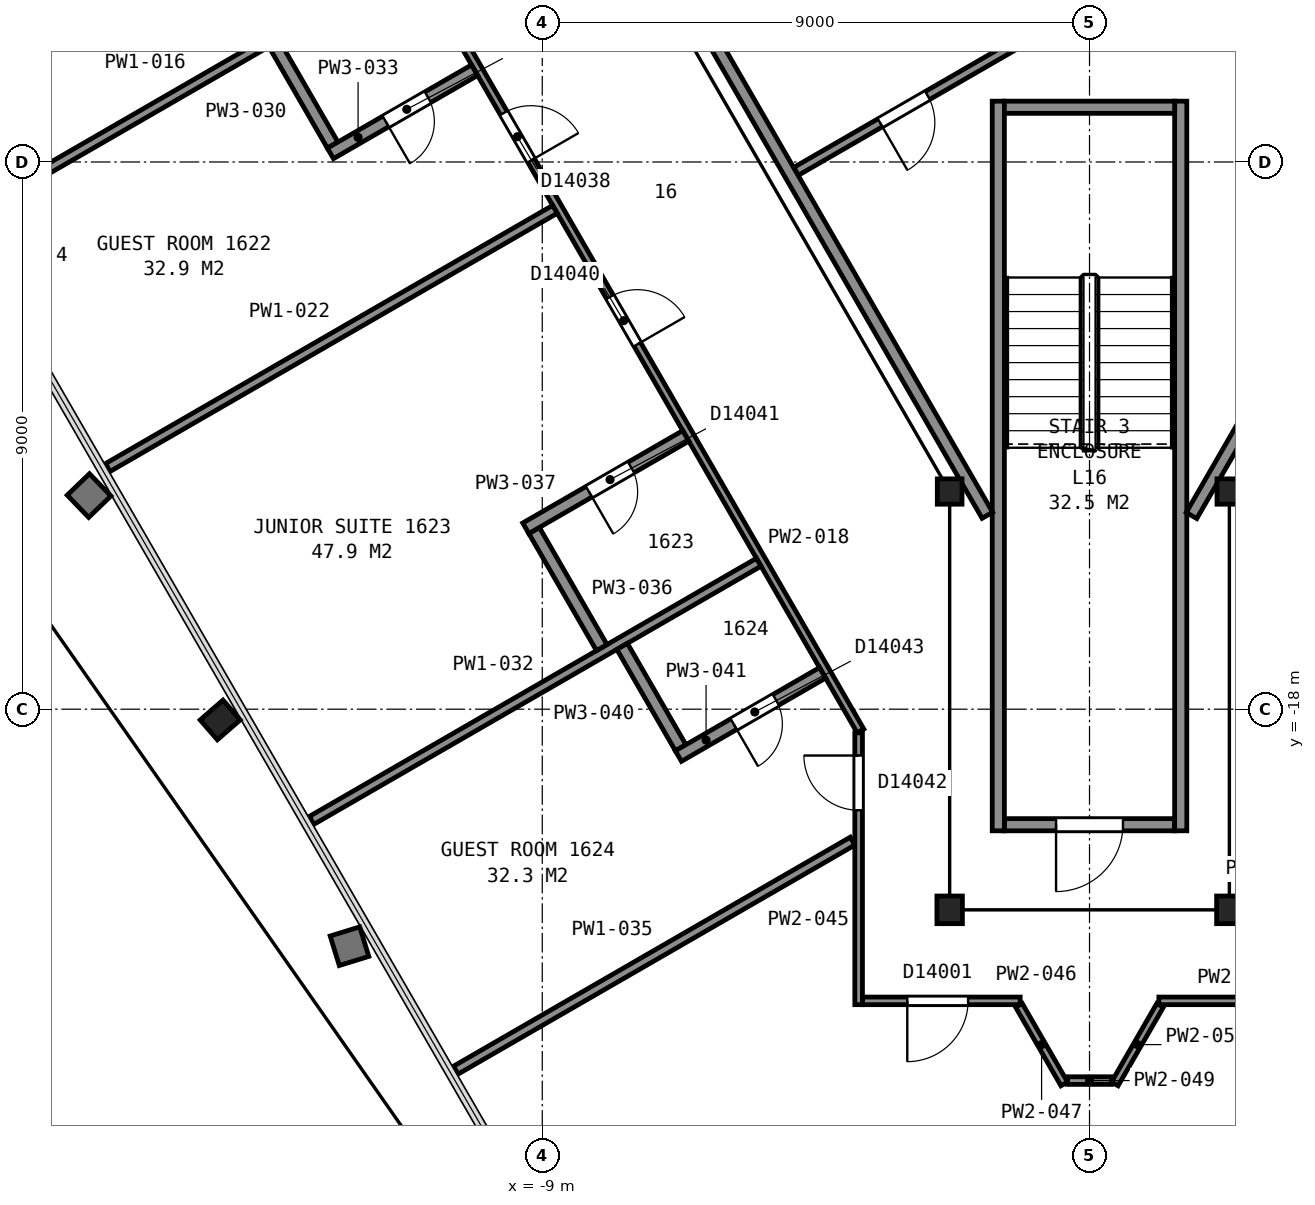
"""IFC4 building model, lengths in metres.
Left out: names, types, materials, properties, quantities, classifications, styles, units other than length and angle.
Written with IfcOpenShell. Run it as: python <this file> out.ifc"""

import sys

from ifc_helpers import new_model, si_unit, direction, frame, frame_2d, origin, origin_2d, place, context, subcontext, project, spatial, rectangle, i_section, extrude, element, fill, save


model = new_model("IFC4")
c1 = context("Model", 3, precision=1e-05, world=origin(), true_north=direction((0.0, 1.0)))
c2 = subcontext(c1, "Body", "Model", "MODEL_VIEW")
j1 = project(units=[si_unit("LENGTHUNIT", "METRE"), si_unit("PLANEANGLEUNIT", "RADIAN")], contexts=[c1])
p1 = place(None, origin())
s1 = spatial("IfcSite", under=j1, at=p1, CompositionType="ELEMENT")
p2 = place(p1, origin())
s2 = spatial("IfcBuilding", under=s1, at=p2, CompositionType="ELEMENT")
p3 = place(p2, frame((0.0, 0.0, 72.8)))
s3 = spatial("IfcBuildingStorey", under=s2, at=p3, CompositionType="ELEMENT", Elevation=72.8)
p4 = place(p3, frame((-14.222, -18.111, 0.025), z_axis=(-0.063660519168, -0.055368890729, 0.996434455566), x_axis=(-0.500027144747, 0.865858806591, 0.01616729924)))
e1 = element("IfcColumn", 1, at=p4, inside=s3, PredefinedType="COLUMN", context=c2, shape_type="SweptSolid", body=[
    extrude(i_section(OverallWidth=0.432, OverallDepth=0.498, WebThickness=0.056, FlangeThickness=0.089, FilletRadius=0.015, at=origin_2d()), origin(), (0.0, 0.0, 1.0), 3.563),
])
p5 = place(p3, frame((-2.3, -14.42, 0.0), z_axis=(0.0, 0.0, 1.0), x_axis=(1.0, 0.0, 0.0)))
e2 = element("IfcColumn", 2, at=p5, inside=s3, PredefinedType="COLUMN", context=c2, shape_type="SweptSolid", body=[
    extrude(i_section(OverallWidth=0.406, OverallDepth=0.417, WebThickness=0.03, FlangeThickness=0.048, FilletRadius=0.015, at=origin_2d()), origin(), (0.0, 0.0, 1.0), 3.6),
])
for number, where, z_axis, x_axis in (
    (3, (-2.3, -21.3, 0.0), (0.0, 0.0, 1.0), (-1.0, 0.0, 0.0)),
    (4, (2.3, -21.3, 0.0), (0.0, 0.0, 1.0), (-1.0, 0.0, 0.0)),
):
    element("IfcColumn", number, at=place(p3, frame(where, z_axis=z_axis, x_axis=x_axis)), inside=s3, PredefinedType="COLUMN", context=c2, shape_type="SweptSolid", body=[
        extrude(i_section(OverallWidth=0.419, OverallDepth=0.455, WebThickness=0.042, FlangeThickness=0.068, FilletRadius=0.015, at=origin_2d()), origin(), (0.0, 0.0, 1.0), 3.6),
    ])
p6 = place(p3, frame((2.3, -14.42, 0.0), z_axis=(0.0, 0.0, 1.0), x_axis=(1.0, 0.0, 0.0)))
e5 = element("IfcColumn", 5, at=p6, inside=s3, PredefinedType="COLUMN", context=c2, shape_type="SweptSolid", body=[
    extrude(i_section(OverallWidth=0.406, OverallDepth=0.417, WebThickness=0.03, FlangeThickness=0.048, FilletRadius=0.015, at=origin_2d()), origin(), (0.0, 0.0, 1.0), 3.6),
])
p7 = place(p3, frame((-1.4, -19.9, 0.0), z_axis=(0.0, 0.0, 1.0), x_axis=(1.0, 0.0, 0.0)))
e6 = element("IfcWall", 6, at=p7, inside=s3, PredefinedType="PARTITIONING", context=c2, shape_type="SweptSolid", body=[
    extrude(rectangle(XDim=2.8, YDim=0.2, at=frame_2d((1.4, 0.0))), origin(), (0.0, 0.0, 1.0), 3.35),
])
p8 = place(p7, frame((0.85, 0.0, 0.0)))
e7 = element("IfcOpeningElement", 7, at=p8, cuts=e6, PredefinedType="OPENING", context=c2, shape_type="SweptSolid", body=[
    extrude(rectangle(XDim=1.1, YDim=2.1, at=frame_2d((0.55, 1.05))), frame((0.0, 0.11, 0.0), z_axis=(0.0, -1.0, 0.0), x_axis=(1.0, 0.0, 0.0)), (0.0, 0.0, 1.0), 0.22),
])
for number, where, z_axis, x_axis in (
    (8, (1.5, -8.0, 0.0), (0.0, 0.0, 1.0), (0.0, -1.0, 0.0)),
    (9, (-1.5, -8.0, 0.0), (0.0, 0.0, 1.0), (0.0, -1.0, 0.0)),
):
    element("IfcWall", number, at=place(p3, frame(where, z_axis=z_axis, x_axis=x_axis)), inside=s3, PredefinedType="PARTITIONING", context=c2, shape_type="SweptSolid", body=[
        extrude(rectangle(XDim=12.0, YDim=0.2, at=frame_2d((6.0, 0.0))), origin(), (0.0, 0.0, 1.0), 3.35),
    ])
p9 = place(p3, frame((-1.4, -8.1, 0.0), z_axis=(0.0, 0.0, 1.0), x_axis=(1.0, 0.0, 0.0)))
e10 = element("IfcWall", 10, at=p9, inside=s3, PredefinedType="PARTITIONING", context=c2, shape_type="SweptSolid", body=[
    extrude(rectangle(XDim=2.8, YDim=0.2, at=frame_2d((1.4, 0.0))), origin(), (0.0, 0.0, 1.0), 3.35),
])
p10 = place(p3, frame((-13.664, 5.946, 0.0), z_axis=(0.0, 0.0, 1.0), x_axis=(0.499994327219, -0.866028678941, 0.0)))
e11 = element("IfcWall", 11, at=p10, inside=s3, PredefinedType="PARTITIONING", context=c2, shape_type="SweptSolid", body=[
    extrude(rectangle(XDim=23.968, YDim=0.2, at=frame_2d((11.984, 0.0))), origin(), (0.0, 0.0, 1.0), 3.35),
])
p11 = place(p3, frame((-4.825, -9.154, 0.0), z_axis=(0.0, 0.0, 1.0), x_axis=(0.866023738697, 0.500002884005, 0.0)))
e12 = element("IfcWall", 12, at=p11, inside=s3, PredefinedType="PARTITIONING", context=c2, shape_type="SweptSolid", body=[
    extrude(rectangle(XDim=4.22, YDim=0.15, at=frame_2d((2.11, 0.0))), origin(), (0.0, 0.0, 1.0), 3.35),
])
p12 = place(p11, frame((1.595, 0.0, 0.0)))
e13 = element("IfcOpeningElement", 13, at=p12, cuts=e12, PredefinedType="OPENING", context=c2, shape_type="SweptSolid", body=[
    extrude(rectangle(XDim=0.9, YDim=2.1, at=frame_2d((0.45, 1.05))), frame((0.0, 0.085, 0.0), z_axis=(0.0, -1.0, 0.0), x_axis=(1.0, 0.0, 0.0)), (0.0, 0.0, 1.0), 0.17),
])
p13 = place(p3, frame((1.677, -14.815, 0.0), z_axis=(0.0, 0.0, 1.0), x_axis=(0.49999445743, 0.866028603765, 0.0)))
e14 = element("IfcWall", 14, at=p13, inside=s3, PredefinedType="PARTITIONING", context=c2, shape_type="SweptSolid", body=[
    extrude(rectangle(XDim=5.905, YDim=0.2, at=frame_2d((2.952, 0.0))), origin(), (0.0, 0.0, 1.0), 3.35),
])
p14 = place(p13, frame((3.855, 0.0, 0.0)))
e15 = element("IfcOpeningElement", 15, at=p14, cuts=e14, PredefinedType="OPENING", context=c2, shape_type="SweptSolid", body=[
    extrude(rectangle(XDim=1.8, YDim=2.1, at=frame_2d((0.9, 1.05))), frame((0.0, 0.11, 0.0), z_axis=(0.0, -1.0, 0.0), x_axis=(1.0, 0.0, 0.0)), (0.0, 0.0, 1.0), 0.22),
])
p15 = place(p3, frame((-18.517, -9.917, 0.0), z_axis=(0.0, 0.0, 1.0), x_axis=(0.866017528739, 0.50001363973, 0.0)))
e16 = element("IfcWall", 16, at=p15, inside=s3, PredefinedType="PARTITIONING", context=c2, shape_type="SweptSolid", body=[
    extrude(rectangle(XDim=8.491, YDim=0.15, at=frame_2d((4.246, 0.0))), origin(), (0.0, 0.0, 1.0), 2.613),
])
p16 = place(p3, frame((-3.766, -18.358, 0.0), z_axis=(0.0, 0.0, 1.0), x_axis=(-0.500003973642, 0.866023109589, 0.0)))
e17 = element("IfcWall", 17, at=p16, inside=s3, PredefinedType="PARTITIONING", context=c2, shape_type="SweptSolid", body=[
    extrude(rectangle(XDim=28.826, YDim=0.125, at=frame_2d((14.413, 0.0))), origin(), (0.0, 0.0, 1.0), 2.613),
])
p17 = place(p16, frame((27.114, 0.0, 0.0)))
e18 = element("IfcOpeningElement", 18, at=p17, cuts=e17, PredefinedType="OPENING", context=c2, shape_type="SweptSolid", body=[
    extrude(rectangle(XDim=0.9, YDim=2.1, at=frame_2d((0.45, 1.05))), frame((0.0, 0.073, 0.0), z_axis=(0.0, -1.0, 0.0), x_axis=(1.0, 0.0, 0.0)), (0.0, 0.0, 1.0), 0.145),
])
p18 = place(p16, frame((20.322, 0.0, 0.0)))
e19 = element("IfcOpeningElement", 19, at=p18, cuts=e17, PredefinedType="OPENING", context=c2, shape_type="SweptSolid", body=[
    extrude(rectangle(XDim=0.9, YDim=2.1, at=frame_2d((0.45, 1.05))), frame((0.0, 0.073, 0.0), z_axis=(0.0, -1.0, 0.0), x_axis=(1.0, 0.0, 0.0)), (0.0, 0.0, 1.0), 0.145),
])
p19 = place(p16, frame((17.68, 0.0, 0.0)))
e20 = element("IfcOpeningElement", 20, at=p19, cuts=e17, PredefinedType="OPENING", context=c2, shape_type="SweptSolid", body=[
    extrude(rectangle(XDim=0.9, YDim=2.1, at=frame_2d((0.45, 1.05))), frame((0.0, 0.073, 0.0), z_axis=(0.0, -1.0, 0.0), x_axis=(1.0, 0.0, 0.0)), (0.0, 0.0, 1.0), 0.145),
])
p20 = place(p16, frame((10.836, 0.0, 0.0)))
e21 = element("IfcOpeningElement", 21, at=p20, cuts=e17, PredefinedType="OPENING", context=c2, shape_type="SweptSolid", body=[
    extrude(rectangle(XDim=0.9, YDim=2.1, at=frame_2d((0.45, 1.05))), frame((0.0, 0.073, 0.0), z_axis=(0.0, -1.0, 0.0), x_axis=(1.0, 0.0, 0.0)), (0.0, 0.0, 1.0), 0.145),
])
p21 = place(p16, frame((7.342, 0.0, 0.0)))
e22 = element("IfcOpeningElement", 22, at=p21, cuts=e17, PredefinedType="OPENING", context=c2, shape_type="SweptSolid", body=[
    extrude(rectangle(XDim=0.9, YDim=2.1, at=frame_2d((0.45, 1.05))), frame((0.0, 0.073, 0.0), z_axis=(0.0, -1.0, 0.0), x_axis=(1.0, 0.0, 0.0)), (0.0, 0.0, 1.0), 0.145),
])
p22 = place(p3, frame((-16.145, -14.025, 0.0), z_axis=(0.0, 0.0, 1.0), x_axis=(0.866024716685, 0.500001190089, 0.0)))
e23 = element("IfcWall", 23, at=p22, inside=s3, PredefinedType="PARTITIONING", context=c2, shape_type="SweptSolid", body=[
    extrude(rectangle(XDim=8.492, YDim=0.15, at=frame_2d((4.246, 0.0))), origin(), (0.0, 0.0, 1.0), 2.613),
])
p23 = place(p3, frame((-13.407, -7.059, 0.0), z_axis=(0.0, 0.0, 1.0), x_axis=(0.499993829411, -0.866028966346, 0.0)))
e24 = element("IfcWall", 24, at=p23, inside=s3, PredefinedType="PARTITIONING", context=c2, shape_type="SweptSolid", body=[
    extrude(rectangle(XDim=1.921, YDim=0.2, at=frame_2d((0.96, 0.0))), origin(), (0.0, 0.0, 1.0), 2.613),
])
p24 = place(p3, frame((-12.794, -19.829, 0.0), z_axis=(0.0, 0.0, 1.0), x_axis=(0.866024716685, 0.500001190089, 0.0)))
e25 = element("IfcWall", 25, at=p24, inside=s3, PredefinedType="PARTITIONING", context=c2, shape_type="SweptSolid", body=[
    extrude(rectangle(XDim=8.492, YDim=0.15, at=frame_2d((4.246, 0.0))), origin(), (0.0, 0.0, 1.0), 2.613),
])
p25 = place(p3, frame((-12.484, -8.859, 0.0), z_axis=(0.0, 0.0, 1.0), x_axis=(0.866028150195, 0.499995243048, 0.0)))
e26 = element("IfcWall", 26, at=p25, inside=s3, PredefinedType="PARTITIONING", context=c2, shape_type="SweptSolid", body=[
    extrude(rectangle(XDim=2.737, YDim=0.2, at=frame_2d((1.369, 0.0))), origin(), (0.0, 0.0, 1.0), 2.613),
])
p26 = place(p25, frame((1.05, 0.0, 0.0)))
e27 = element("IfcOpeningElement", 27, at=p26, cuts=e26, PredefinedType="OPENING", context=c2, shape_type="SweptSolid", body=[
    extrude(rectangle(XDim=0.8, YDim=2.1, at=frame_2d((0.4, 1.05))), frame((0.0, 0.11, 0.0), z_axis=(0.0, -1.0, 0.0), x_axis=(1.0, 0.0, 0.0)), (0.0, 0.0, 1.0), 0.22),
])
p27 = place(p3, frame((-10.423, -23.937, 0.0), z_axis=(0.0, 0.0, 1.0), x_axis=(0.866039368072, 0.499975812365, 0.0)))
e28 = element("IfcWall", 28, at=p27, inside=s3, PredefinedType="PARTITIONING", context=c2, shape_type="SweptSolid", body=[
    extrude(rectangle(XDim=7.535, YDim=0.15, at=frame_2d((3.768, 0.0))), origin(), (0.0, 0.0, 1.0), 2.613),
])
p28 = place(p3, frame((-9.134, -15.061, 0.0), z_axis=(0.0, 0.0, 1.0), x_axis=(0.500092923031, -0.865971748, 0.0)))
e29 = element("IfcWall", 29, at=p28, inside=s3, PredefinedType="PARTITIONING", context=c2, shape_type="SweptSolid", body=[
    extrude(rectangle(XDim=2.225, YDim=0.2, at=frame_2d((1.112, 0.0))), origin(), (0.0, 0.0, 1.0), 2.613),
])
p29 = place(p3, frame((-6.64, -13.505, 0.0), z_axis=(0.0, 0.0, 1.0), x_axis=(-0.866038344573, -0.499977585228, 0.0)))
e30 = element("IfcWall", 30, at=p29, inside=s3, PredefinedType="PARTITIONING", context=c2, shape_type="SweptSolid", body=[
    extrude(rectangle(XDim=3.037, YDim=0.2, at=frame_2d((1.519, 0.0))), origin(), (0.0, 0.0, 1.0), 2.613),
])
p30 = place(p29, frame((1.037, 0.0, 0.0)))
e31 = element("IfcOpeningElement", 31, at=p30, cuts=e30, PredefinedType="OPENING", context=c2, shape_type="SweptSolid", body=[
    extrude(rectangle(XDim=0.8, YDim=2.1, at=frame_2d((0.4, 1.05))), frame((0.0, 0.11, 0.0), z_axis=(0.0, -1.0, 0.0), x_axis=(1.0, 0.0, 0.0)), (0.0, 0.0, 1.0), 0.22),
])
p31 = place(p3, frame((-7.687, -16.967, 0.0), z_axis=(0.0, 0.0, 1.0), x_axis=(0.500026156197, -0.86601030197, 0.0)))
e32 = element("IfcWall", 32, at=p31, inside=s3, PredefinedType="PARTITIONING", context=c2, shape_type="SweptSolid", body=[
    extrude(rectangle(XDim=1.925, YDim=0.2, at=frame_2d((0.963, 0.0))), origin(), (0.0, 0.0, 1.0), 2.613),
])
p32 = place(p3, frame((-6.76, -18.771, 0.0), z_axis=(0.0, 0.0, 1.0), x_axis=(0.866005850709, 0.50003386539, 0.0)))
e33 = element("IfcWall", 33, at=p32, inside=s3, PredefinedType="PARTITIONING", context=c2, shape_type="SweptSolid", body=[
    extrude(rectangle(XDim=2.737, YDim=0.2, at=frame_2d((1.369, 0.0))), origin(), (0.0, 0.0, 1.0), 2.613),
])
p33 = place(p32, frame((1.05, 0.0, 0.0)))
e34 = element("IfcOpeningElement", 34, at=p33, cuts=e33, PredefinedType="OPENING", context=c2, shape_type="SweptSolid", body=[
    extrude(rectangle(XDim=0.8, YDim=2.1, at=frame_2d((0.4, 1.05))), frame((0.0, 0.11, 0.0), z_axis=(0.0, -1.0, 0.0), x_axis=(1.0, 0.0, 0.0)), (0.0, 0.0, 1.0), 0.22),
])
p34 = place(p3, frame((-3.797, -22.86, 0.0), z_axis=(0.0, 0.0, 1.0), x_axis=(0.0, 1.0, 0.0)))
e35 = element("IfcWall", 35, at=p34, inside=s3, PredefinedType="PARTITIONING", context=c2, shape_type="SweptSolid", body=[
    extrude(rectangle(XDim=4.471, YDim=0.125, at=frame_2d((2.235, 0.0))), origin(), (0.0, 0.0, 1.0), 2.613),
])
p35 = place(p34, frame((3.198, 0.0, 0.0)))
e36 = element("IfcOpeningElement", 36, at=p35, cuts=e35, PredefinedType="OPENING", context=c2, shape_type="SweptSolid", body=[
    extrude(rectangle(XDim=0.9, YDim=2.1, at=frame_2d((0.45, 1.05))), frame((0.0, 0.073, 0.0), z_axis=(0.0, -1.0, 0.0), x_axis=(1.0, 0.0, 0.0)), (0.0, 0.0, 1.0), 0.145),
])
p36 = place(p3, frame((-1.14, -22.797, 0.0), z_axis=(0.0, 0.0, 1.0), x_axis=(-1.0, 0.0, 0.0)))
e37 = element("IfcWall", 37, at=p36, inside=s3, PredefinedType="PARTITIONING", context=c2, shape_type="SweptSolid", body=[
    extrude(rectangle(XDim=2.592, YDim=0.125, at=frame_2d((1.296, 0.0))), origin(), (0.0, 0.0, 1.0), 2.613),
])
p37 = place(p36, frame((0.856, 0.0, 0.0)))
e38 = element("IfcOpeningElement", 38, at=p37, cuts=e37, PredefinedType="OPENING", context=c2, shape_type="SweptSolid", body=[
    extrude(rectangle(XDim=1.0, YDim=2.1, at=frame_2d((0.5, 1.05))), frame((0.0, 0.073, 0.0), z_axis=(0.0, -1.0, 0.0), x_axis=(1.0, 0.0, 0.0)), (0.0, 0.0, 1.0), 0.145),
])
p38 = place(p3, frame((-1.161, -22.871, 0.0), z_axis=(0.0, 0.0, 1.0), x_axis=(0.499609040113, -0.866251006947, 0.0)))
e39 = element("IfcWall", 39, at=p38, inside=s3, PredefinedType="PARTITIONING", context=c2, shape_type="SweptSolid", body=[
    extrude(rectangle(XDim=1.491, YDim=0.125, at=frame_2d((0.746, 0.0))), origin(), (0.0, 0.0, 1.0), 2.613),
])
p39 = place(p3, frame((-0.362, -24.108, 0.0), z_axis=(0.0, 0.0, 1.0), x_axis=(1.0, 0.0, 0.0)))
e40 = element("IfcWall", 40, at=p39, inside=s3, PredefinedType="PARTITIONING", context=c2, shape_type="SweptSolid", body=[
    extrude(rectangle(XDim=0.724, YDim=0.125, at=frame_2d((0.362, 0.0))), origin(), (0.0, 0.0, 1.0), 2.613),
])
p40 = place(p3, frame((0.416, -24.162, 0.0), z_axis=(0.0, 0.0, 1.0), x_axis=(0.499609040113, 0.866251006947, 0.0)))
e41 = element("IfcWall", 41, at=p40, inside=s3, PredefinedType="PARTITIONING", context=c2, shape_type="SweptSolid", body=[
    extrude(rectangle(XDim=1.491, YDim=0.125, at=frame_2d((0.746, 0.0))), origin(), (0.0, 0.0, 1.0), 2.613),
])
p41 = place(p3, frame((1.14, -22.797, 0.0), z_axis=(0.0, 0.0, 1.0), x_axis=(1.0, 0.0, 0.0)))
e42 = element("IfcWall", 42, at=p41, inside=s3, PredefinedType="PARTITIONING", context=c2, shape_type="SweptSolid", body=[
    extrude(rectangle(XDim=2.592, YDim=0.125, at=frame_2d((1.296, 0.0))), origin(), (0.0, 0.0, 1.0), 2.613),
])
p42 = place(p8, origin())
e43 = element("IfcDoor", 43, at=p42, inside=s3, OperationType="SINGLE_SWING_LEFT", PredefinedType="DOOR", context=c2, shape_type="SweptSolid", body=[
    extrude(rectangle(XDim=1.1, YDim=2.1, at=frame_2d((0.55, 1.05))), frame((0.0, 0.025, 0.0), z_axis=(0.0, -1.0, 0.0), x_axis=(1.0, 0.0, 0.0)), (0.0, 0.0, 1.0), 0.05),
])
fill(e7, e43)
p43 = place(p12, origin())
e44 = element("IfcDoor", 44, at=p43, inside=s3, OperationType="SINGLE_SWING_LEFT", PredefinedType="DOOR", context=c2, shape_type="SweptSolid", body=[
    extrude(rectangle(XDim=0.9, YDim=2.1, at=frame_2d((0.45, 1.05))), frame((0.0, 0.025, 0.0), z_axis=(0.0, -1.0, 0.0), x_axis=(1.0, 0.0, 0.0)), (0.0, 0.0, 1.0), 0.05),
])
fill(e13, e44)
p44 = place(p20, origin())
e45 = element("IfcDoor", 45, at=p44, inside=s3, OperationType="SINGLE_SWING_LEFT", PredefinedType="DOOR", context=c2, shape_type="SweptSolid", body=[
    extrude(rectangle(XDim=0.9, YDim=2.1, at=frame_2d((0.45, 1.05))), frame((0.0, 0.025, 0.0), z_axis=(0.0, -1.0, 0.0), x_axis=(1.0, 0.0, 0.0)), (0.0, 0.0, 1.0), 0.05),
])
fill(e21, e45)
p45 = place(p21, origin())
e46 = element("IfcDoor", 46, at=p45, inside=s3, OperationType="SINGLE_SWING_LEFT", PredefinedType="DOOR", context=c2, shape_type="SweptSolid", body=[
    extrude(rectangle(XDim=0.9, YDim=2.1, at=frame_2d((0.45, 1.05))), frame((0.0, 0.025, 0.0), z_axis=(0.0, -1.0, 0.0), x_axis=(1.0, 0.0, 0.0)), (0.0, 0.0, 1.0), 0.05),
])
fill(e22, e46)
p46 = place(p26, origin())
e47 = element("IfcDoor", 47, at=p46, inside=s3, OperationType="SINGLE_SWING_LEFT", PredefinedType="DOOR", context=c2, shape_type="SweptSolid", body=[
    extrude(rectangle(XDim=0.8, YDim=2.1, at=frame_2d((0.4, 1.05))), frame((0.0, 0.025, 0.0), z_axis=(0.0, -1.0, 0.0), x_axis=(1.0, 0.0, 0.0)), (0.0, 0.0, 1.0), 0.05),
])
fill(e27, e47)
p47 = place(p30, origin())
e48 = element("IfcDoor", 48, at=p47, inside=s3, OperationType="SINGLE_SWING_RIGHT", PredefinedType="DOOR", context=c2, shape_type="SweptSolid", body=[
    extrude(rectangle(XDim=0.8, YDim=2.1, at=frame_2d((0.4, 1.05))), frame((0.0, 0.025, 0.0), z_axis=(0.0, -1.0, 0.0), x_axis=(1.0, 0.0, 0.0)), (0.0, 0.0, 1.0), 0.05),
])
fill(e31, e48)
p48 = place(p33, origin())
e49 = element("IfcDoor", 49, at=p48, inside=s3, OperationType="SINGLE_SWING_LEFT", PredefinedType="DOOR", context=c2, shape_type="SweptSolid", body=[
    extrude(rectangle(XDim=0.8, YDim=2.1, at=frame_2d((0.4, 1.05))), frame((0.0, 0.025, 0.0), z_axis=(0.0, -1.0, 0.0), x_axis=(1.0, 0.0, 0.0)), (0.0, 0.0, 1.0), 0.05),
])
fill(e34, e49)
p49 = place(p35, origin())
e50 = element("IfcDoor", 50, at=p49, inside=s3, OperationType="SINGLE_SWING_RIGHT", PredefinedType="DOOR", context=c2, shape_type="SweptSolid", body=[
    extrude(rectangle(XDim=0.9, YDim=2.1, at=frame_2d((0.45, 1.05))), frame((0.0, 0.025, 0.0), z_axis=(0.0, -1.0, 0.0), x_axis=(1.0, 0.0, 0.0)), (0.0, 0.0, 1.0), 0.05),
])
fill(e36, e50)
p50 = place(p37, origin())
e51 = element("IfcDoor", 51, at=p50, inside=s3, OperationType="SINGLE_SWING_RIGHT", PredefinedType="DOOR", context=c2, shape_type="SweptSolid", body=[
    extrude(rectangle(XDim=1.0, YDim=2.1, at=frame_2d((0.5, 1.05))), frame((0.0, 0.025, 0.0), z_axis=(0.0, -1.0, 0.0), x_axis=(1.0, 0.0, 0.0)), (0.0, 0.0, 1.0), 0.05),
])
fill(e38, e51)
save(model, sys.argv[1])
